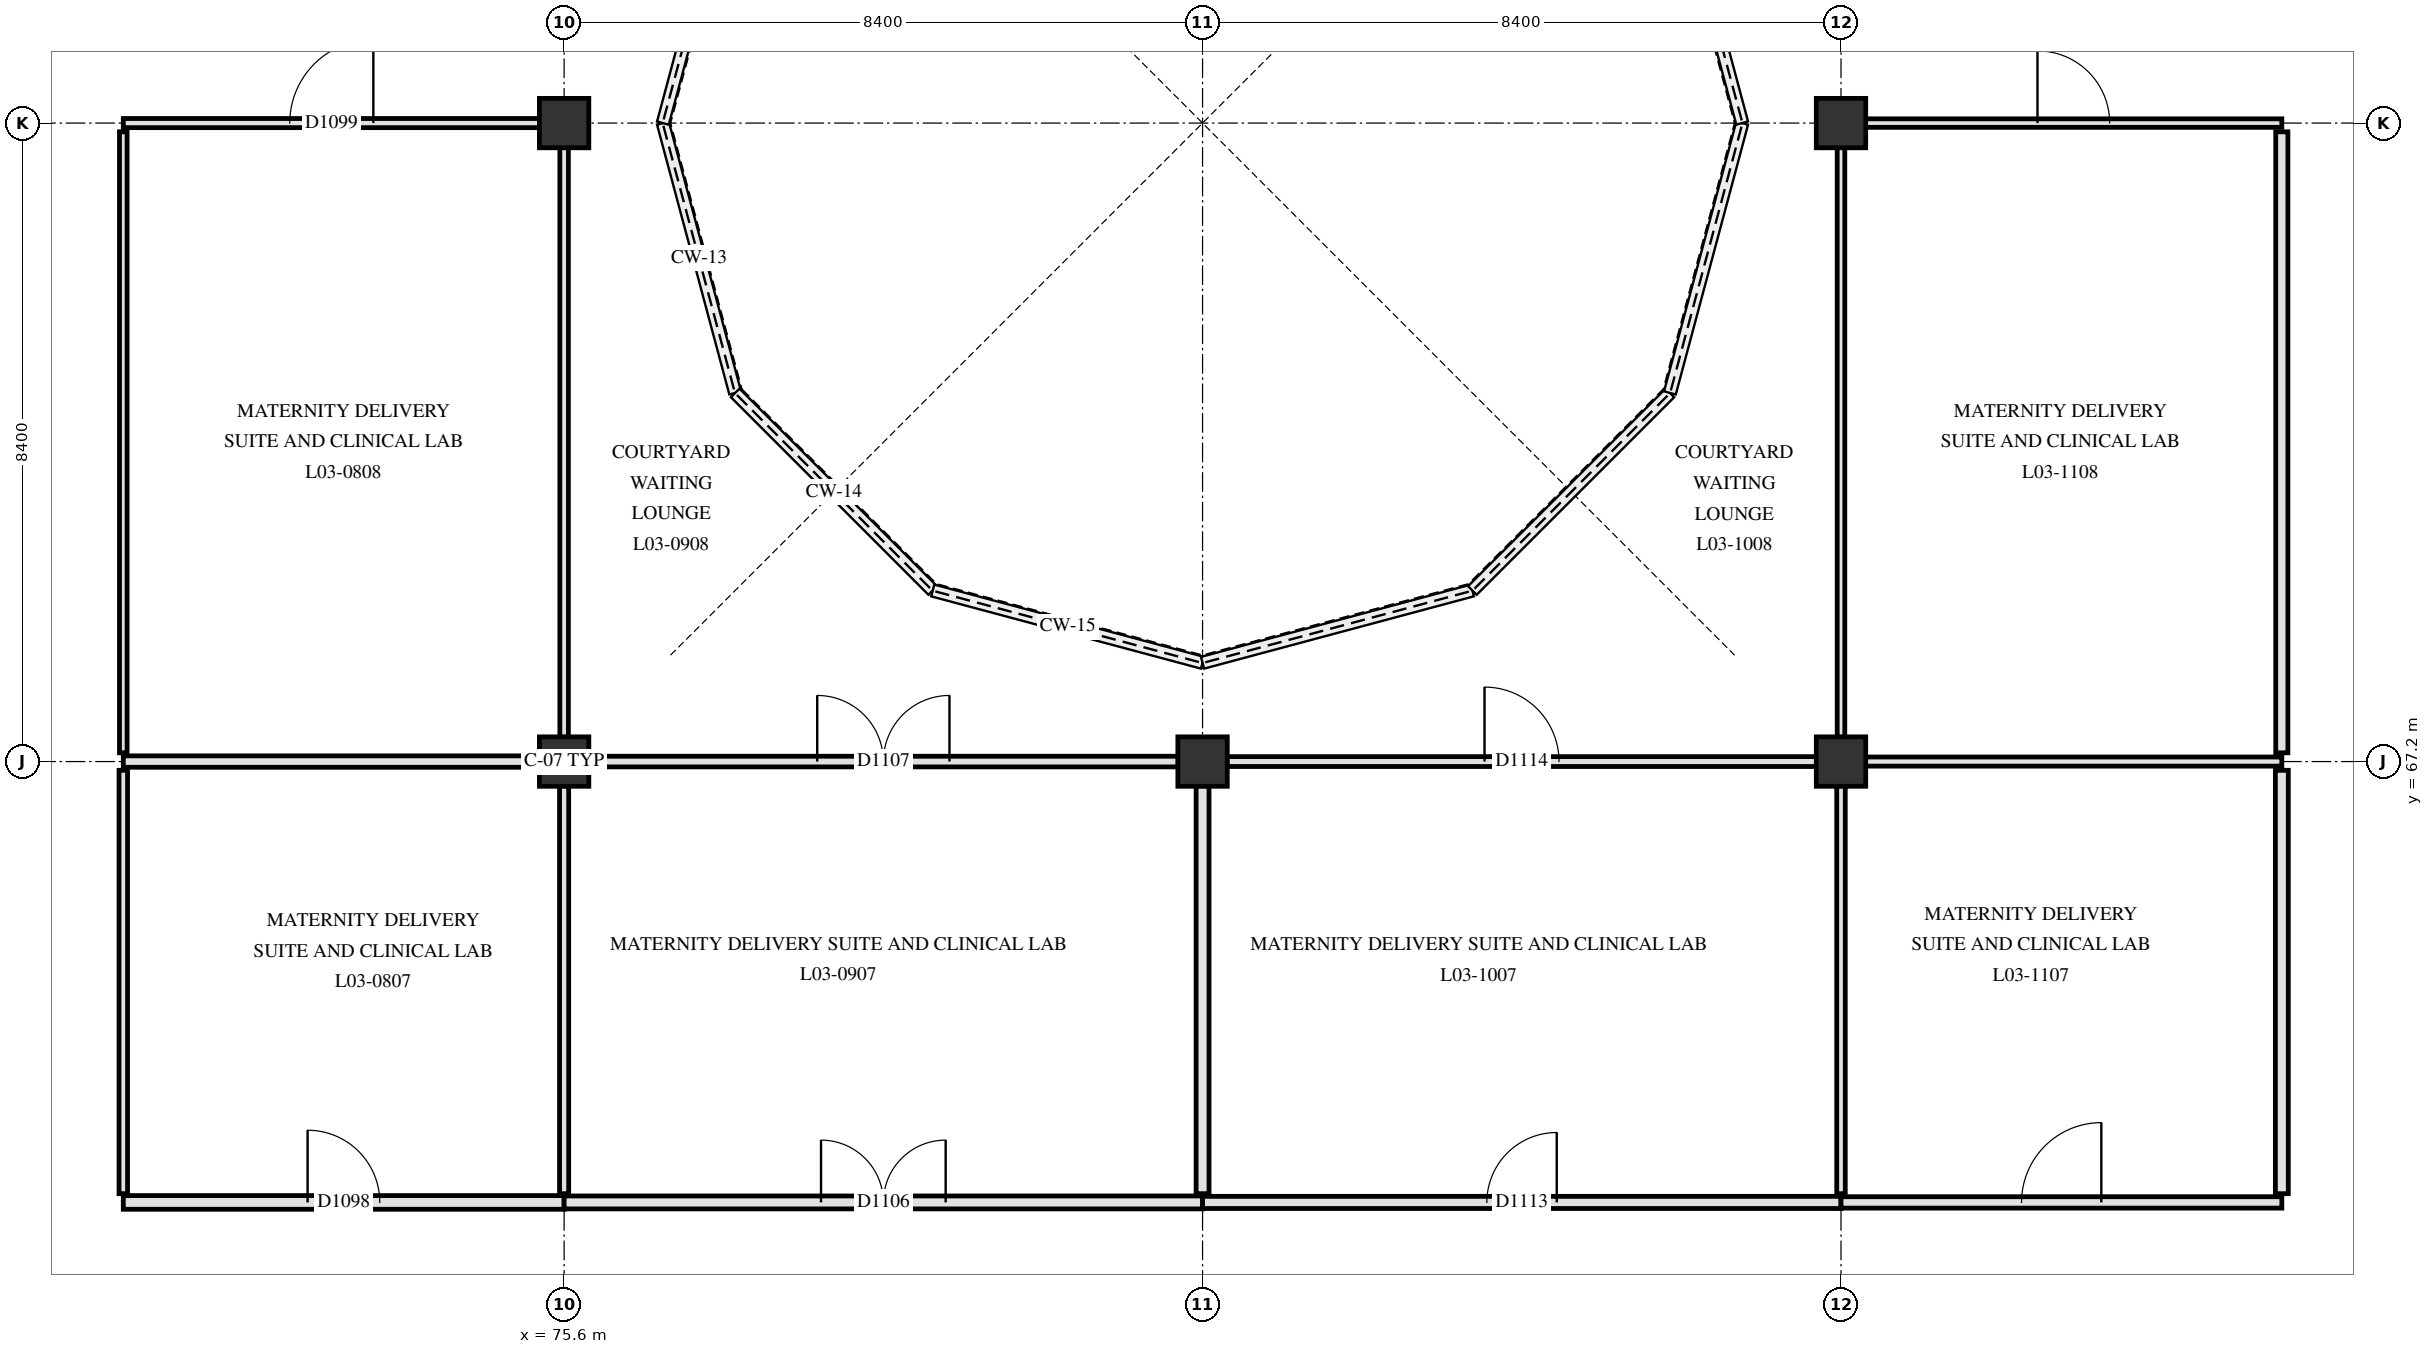
"""IFC4 building model, lengths in metres.
Left out: names, types, materials, properties, quantities, classifications, styles, units other than length and angle.
Written with IfcOpenShell. Run it as: python <this file> out.ifc"""

import sys

from ifc_helpers import new_model, si_unit, direction, frame, frame_2d, origin, origin_2d, place, context, subcontext, project, spatial, rectangle, circle, extrude, element, fill, save


model = new_model("IFC4")
c1 = context("Model", 3, precision=1e-05, world=origin(), true_north=direction((0.0, 1.0)))
c2 = subcontext(c1, "Body", "Model", "MODEL_VIEW")
j1 = project(units=[si_unit("LENGTHUNIT", "METRE"), si_unit("PLANEANGLEUNIT", "RADIAN")], contexts=[c1])
p1 = place(None, origin())
s1 = spatial("IfcSite", under=j1, at=p1, CompositionType="ELEMENT")
p2 = place(p1, origin())
s2 = spatial("IfcBuilding", under=s1, at=p2, CompositionType="ELEMENT")
p3 = place(p2, frame((0.0, 0.0, 14.4)))
s3 = spatial("IfcBuildingStorey", under=s2, at=p3, CompositionType="ELEMENT", Elevation=14.4)
for number, where, z_axis, x_axis in (
    (1, (75.6, 67.2, 0.0), (0.0, 0.0, 1.0), (1.0, 0.0, 0.0)),
    (2, (75.6, 75.6, 0.0), (0.0, 0.0, 1.0), (1.0, 0.0, 0.0)),
    (3, (84.0, 67.2, 0.0), (0.0, 0.0, 1.0), (1.0, 0.0, 0.0)),
    (4, (92.4, 67.2, 0.0), (0.0, 0.0, 1.0), (1.0, 0.0, 0.0)),
    (5, (92.4, 75.6, 0.0), (0.0, 0.0, 1.0), (1.0, 0.0, 0.0)),
):
    element("IfcColumn", number, at=place(p3, frame(where, z_axis=z_axis, x_axis=x_axis)), inside=s3, PredefinedType="COLUMN", context=c2, shape_type="SweptSolid", body=[
        extrude(circle(Radius=0.325, at=origin_2d()), origin(), (0.0, 0.0, 1.0), 4.2),
    ])
p4 = place(p3, frame((69.8, 61.4, 0.0), z_axis=(0.0, 0.0, 1.0), x_axis=(1.0, 0.0, 0.0)))
e6 = element("IfcWall", 6, at=p4, inside=s3, PredefinedType="PARTITIONING", context=c2, shape_type="SweptSolid", body=[
    extrude(rectangle(XDim=5.8, YDim=0.18, at=frame_2d((2.9, 0.0))), origin(), (0.0, 0.0, 1.0), 3.33),
])
p5 = place(p4, frame((2.425, 0.0, 0.0)))
e7 = element("IfcOpeningElement", 7, at=p5, cuts=e6, PredefinedType="OPENING", context=c2, shape_type="SweptSolid", body=[
    extrude(rectangle(XDim=0.95, YDim=2.1, at=frame_2d((0.475, 1.05))), frame((0.0, 0.1, 0.0), z_axis=(0.0, -1.0, 0.0), x_axis=(1.0, 0.0, 0.0)), (0.0, 0.0, 1.0), 0.2),
])
p6 = place(p3, frame((75.6, 61.4, 0.0), z_axis=(0.0, 0.0, 1.0), x_axis=(1.0, 0.0, 0.0)))
e8 = element("IfcWall", 8, at=p6, inside=s3, PredefinedType="PARTITIONING", context=c2, shape_type="SweptSolid", body=[
    extrude(rectangle(XDim=8.4, YDim=0.17, at=frame_2d((4.2, 0.0))), origin(), (0.0, 0.0, 1.0), 3.33),
])
p7 = place(p6, frame((3.38, 0.0, 0.0)))
e9 = element("IfcOpeningElement", 9, at=p7, cuts=e8, PredefinedType="OPENING", context=c2, shape_type="SweptSolid", body=[
    extrude(rectangle(XDim=1.64, YDim=2.28, at=frame_2d((0.82, 1.14))), frame((0.0, 0.095, 0.0), z_axis=(0.0, -1.0, 0.0), x_axis=(1.0, 0.0, 0.0)), (0.0, 0.0, 1.0), 0.19),
])
p8 = place(p3, frame((84.0, 61.4, 0.0), z_axis=(0.0, 0.0, 1.0), x_axis=(1.0, 0.0, 0.0)))
e10 = element("IfcWall", 10, at=p8, inside=s3, PredefinedType="PARTITIONING", context=c2, shape_type="SweptSolid", body=[
    extrude(rectangle(XDim=8.4, YDim=0.16, at=frame_2d((4.2, 0.0))), origin(), (0.0, 0.0, 1.0), 3.33),
])
p9 = place(p8, frame((3.74, 0.0, 0.0)))
e11 = element("IfcOpeningElement", 11, at=p9, cuts=e10, PredefinedType="OPENING", context=c2, shape_type="SweptSolid", body=[
    extrude(rectangle(XDim=0.92, YDim=2.08, at=frame_2d((0.46, 1.04))), frame((0.0, 0.09, 0.0), z_axis=(0.0, -1.0, 0.0), x_axis=(1.0, 0.0, 0.0)), (0.0, 0.0, 1.0), 0.18),
])
p10 = place(p3, frame((92.4, 61.4, 0.0), z_axis=(0.0, 0.0, 1.0), x_axis=(1.0, 0.0, 0.0)))
e12 = element("IfcWall", 12, at=p10, inside=s3, PredefinedType="PARTITIONING", context=c2, shape_type="SweptSolid", body=[
    extrude(rectangle(XDim=5.8, YDim=0.15, at=frame_2d((2.9, 0.0))), origin(), (0.0, 0.0, 1.0), 3.33),
])
p11 = place(p10, frame((2.375, 0.0, 0.0)))
e13 = element("IfcOpeningElement", 13, at=p11, cuts=e12, PredefinedType="OPENING", context=c2, shape_type="SweptSolid", body=[
    extrude(rectangle(XDim=1.05, YDim=2.15, at=frame_2d((0.525, 1.075))), frame((0.0, 0.085, 0.0), z_axis=(0.0, -1.0, 0.0), x_axis=(1.0, 0.0, 0.0)), (0.0, 0.0, 1.0), 0.17),
])
p12 = place(p3, frame((69.8, 67.2, 0.0), z_axis=(0.0, 0.0, 1.0), x_axis=(1.0, 0.0, 0.0)))
e14 = element("IfcWall", 14, at=p12, inside=s3, PredefinedType="PARTITIONING", context=c2, shape_type="SweptSolid", body=[
    extrude(rectangle(XDim=5.48, YDim=0.15, at=frame_2d((2.74, 0.0))), origin(), (0.0, 0.0, 1.0), 3.28),
])
p13 = place(p3, frame((75.92, 67.2, 0.0), z_axis=(0.0, 0.0, 1.0), x_axis=(1.0, 0.0, 0.0)))
e15 = element("IfcWall", 15, at=p13, inside=s3, PredefinedType="PARTITIONING", context=c2, shape_type="SweptSolid", body=[
    extrude(rectangle(XDim=7.76, YDim=0.14, at=frame_2d((3.88, 0.0))), origin(), (0.0, 0.0, 1.0), 3.28),
])
p14 = place(p13, frame((3.01, 0.0, 0.0)))
e16 = element("IfcOpeningElement", 16, at=p14, cuts=e15, PredefinedType="OPENING", context=c2, shape_type="SweptSolid", body=[
    extrude(rectangle(XDim=1.74, YDim=2.24, at=frame_2d((0.87, 1.12))), frame((0.0, 0.08, 0.0), z_axis=(0.0, -1.0, 0.0), x_axis=(1.0, 0.0, 0.0)), (0.0, 0.0, 1.0), 0.16),
])
p15 = place(p3, frame((84.32, 67.2, 0.0), z_axis=(0.0, 0.0, 1.0), x_axis=(1.0, 0.0, 0.0)))
e17 = element("IfcWall", 17, at=p15, inside=s3, PredefinedType="PARTITIONING", context=c2, shape_type="SweptSolid", body=[
    extrude(rectangle(XDim=7.76, YDim=0.13, at=frame_2d((3.88, 0.0))), origin(), (0.0, 0.0, 1.0), 3.28),
])
p16 = place(p15, frame((3.39, 0.0, 0.0)))
e18 = element("IfcOpeningElement", 18, at=p16, cuts=e17, PredefinedType="OPENING", context=c2, shape_type="SweptSolid", body=[
    extrude(rectangle(XDim=0.98, YDim=2.12, at=frame_2d((0.49, 1.06))), frame((0.0, 0.075, 0.0), z_axis=(0.0, -1.0, 0.0), x_axis=(1.0, 0.0, 0.0)), (0.0, 0.0, 1.0), 0.15),
])
p17 = place(p3, frame((92.72, 67.2, 0.0), z_axis=(0.0, 0.0, 1.0), x_axis=(1.0, 0.0, 0.0)))
e19 = element("IfcWall", 19, at=p17, inside=s3, PredefinedType="PARTITIONING", context=c2, shape_type="SweptSolid", body=[
    extrude(rectangle(XDim=5.48, YDim=0.12, at=frame_2d((2.74, 0.0))), origin(), (0.0, 0.0, 1.0), 3.29),
])
p18 = place(p3, frame((69.8, 75.6, 0.0), z_axis=(0.0, 0.0, 1.0), x_axis=(1.0, 0.0, 0.0)))
e20 = element("IfcWall", 20, at=p18, inside=s3, PredefinedType="PARTITIONING", context=c2, shape_type="SweptSolid", body=[
    extrude(rectangle(XDim=5.48, YDim=0.12, at=frame_2d((2.74, 0.0))), origin(), (0.0, 0.0, 1.0), 3.28),
])
p19 = place(p18, frame((2.19, 0.0, 0.0)))
e21 = element("IfcOpeningElement", 21, at=p19, cuts=e20, PredefinedType="OPENING", context=c2, shape_type="SweptSolid", body=[
    extrude(rectangle(XDim=1.1, YDim=2.15, at=frame_2d((0.55, 1.075))), frame((0.0, 0.07, 0.0), z_axis=(0.0, -1.0, 0.0), x_axis=(1.0, 0.0, 0.0)), (0.0, 0.0, 1.0), 0.14),
])
p20 = place(p3, frame((92.72, 75.6, 0.0), z_axis=(0.0, 0.0, 1.0), x_axis=(1.0, 0.0, 0.0)))
e22 = element("IfcWall", 22, at=p20, inside=s3, PredefinedType="PARTITIONING", context=c2, shape_type="SweptSolid", body=[
    extrude(rectangle(XDim=5.48, YDim=0.112, at=frame_2d((2.74, 0.0))), origin(), (0.0, 0.0, 1.0), 3.29),
])
p21 = place(p20, frame((2.265, 0.0, 0.0)))
e23 = element("IfcOpeningElement", 23, at=p21, cuts=e22, PredefinedType="OPENING", context=c2, shape_type="SweptSolid", body=[
    extrude(rectangle(XDim=0.95, YDim=2.1, at=frame_2d((0.475, 1.05))), frame((0.0, 0.066, 0.0), z_axis=(0.0, -1.0, 0.0), x_axis=(1.0, 0.0, 0.0)), (0.0, 0.0, 1.0), 0.132),
])
p22 = place(p3, frame((69.8, 61.515, 0.0), z_axis=(0.0, 0.0, 1.0), x_axis=(0.0, 1.0, 0.0)))
e24 = element("IfcWall", 24, at=p22, inside=s3, PredefinedType="PARTITIONING", context=c2, shape_type="SweptSolid", body=[
    extrude(rectangle(XDim=5.57, YDim=0.112, at=frame_2d((2.785, 0.0))), origin(), (0.0, 0.0, 1.0), 3.28),
])
p23 = place(p3, frame((69.8, 67.315, 0.0), z_axis=(0.0, 0.0, 1.0), x_axis=(0.0, 1.0, 0.0)))
e25 = element("IfcWall", 25, at=p23, inside=s3, PredefinedType="PARTITIONING", context=c2, shape_type="SweptSolid", body=[
    extrude(rectangle(XDim=8.17, YDim=0.1, at=frame_2d((4.085, 0.0))), origin(), (0.0, 0.0, 1.0), 3.28),
])
p24 = place(p3, frame((75.6, 61.515, 0.0), z_axis=(0.0, 0.0, 1.0), x_axis=(0.0, 1.0, 0.0)))
e26 = element("IfcWall", 26, at=p24, inside=s3, PredefinedType="PARTITIONING", context=c2, shape_type="SweptSolid", body=[
    extrude(rectangle(XDim=5.365, YDim=0.12, at=frame_2d((2.683, 0.0))), origin(), (0.0, 0.0, 1.0), 3.33),
])
p25 = place(p3, frame((75.6, 67.52, 0.0), z_axis=(0.0, 0.0, 1.0), x_axis=(0.0, 1.0, 0.0)))
e27 = element("IfcWall", 27, at=p25, inside=s3, PredefinedType="PARTITIONING", context=c2, shape_type="SweptSolid", body=[
    extrude(rectangle(XDim=7.76, YDim=0.112, at=frame_2d((3.88, 0.0))), origin(), (0.0, 0.0, 1.0), 3.33),
])
p26 = place(p3, frame((84.0, 61.515, 0.0), z_axis=(0.0, 0.0, 1.0), x_axis=(0.0, 1.0, 0.0)))
e28 = element("IfcWall", 28, at=p26, inside=s3, PredefinedType="PARTITIONING", context=c2, shape_type="SweptSolid", body=[
    extrude(rectangle(XDim=5.365, YDim=0.17, at=frame_2d((2.683, 0.0))), origin(), (0.0, 0.0, 1.0), 3.33),
])
p27 = place(p3, frame((92.4, 61.515, 0.0), z_axis=(0.0, 0.0, 1.0), x_axis=(0.0, 1.0, 0.0)))
e29 = element("IfcWall", 29, at=p27, inside=s3, PredefinedType="PARTITIONING", context=c2, shape_type="SweptSolid", body=[
    extrude(rectangle(XDim=5.365, YDim=0.112, at=frame_2d((2.683, 0.0))), origin(), (0.0, 0.0, 1.0), 3.33),
])
p28 = place(p3, frame((92.4, 67.52, 0.0), z_axis=(0.0, 0.0, 1.0), x_axis=(0.0, 1.0, 0.0)))
e30 = element("IfcWall", 30, at=p28, inside=s3, PredefinedType="PARTITIONING", context=c2, shape_type="SweptSolid", body=[
    extrude(rectangle(XDim=7.76, YDim=0.1, at=frame_2d((3.88, 0.0))), origin(), (0.0, 0.0, 1.0), 3.33),
])
p29 = place(p3, frame((98.2, 61.515, 0.0), z_axis=(0.0, 0.0, 1.0), x_axis=(0.0, 1.0, 0.0)))
e31 = element("IfcWall", 31, at=p29, inside=s3, PredefinedType="PARTITIONING", context=c2, shape_type="SweptSolid", body=[
    extrude(rectangle(XDim=5.57, YDim=0.17, at=frame_2d((2.785, 0.0))), origin(), (0.0, 0.0, 1.0), 3.29),
])
p30 = place(p3, frame((98.2, 67.315, 0.0), z_axis=(0.0, 0.0, 1.0), x_axis=(0.0, 1.0, 0.0)))
e32 = element("IfcWall", 32, at=p30, inside=s3, PredefinedType="PARTITIONING", context=c2, shape_type="SweptSolid", body=[
    extrude(rectangle(XDim=8.17, YDim=0.16, at=frame_2d((4.085, 0.0))), origin(), (0.0, 0.0, 1.0), 3.29),
])
p31 = place(p5, origin())
e33 = element("IfcDoor", 33, at=p31, inside=s3, OperationType="SINGLE_SWING_LEFT", PredefinedType="DOOR", context=c2, shape_type="SweptSolid", body=[
    extrude(rectangle(XDim=0.95, YDim=2.1, at=frame_2d((0.475, 1.05))), frame((0.0, 0.025, 0.0), z_axis=(0.0, -1.0, 0.0), x_axis=(1.0, 0.0, 0.0)), (0.0, 0.0, 1.0), 0.05),
])
fill(e7, e33)
p32 = place(p19, origin())
e34 = element("IfcDoor", 34, at=p32, inside=s3, OperationType="SINGLE_SWING_RIGHT", PredefinedType="DOOR", context=c2, shape_type="SweptSolid", body=[
    extrude(rectangle(XDim=1.1, YDim=2.15, at=frame_2d((0.55, 1.075))), frame((0.0, 0.025, 0.0), z_axis=(0.0, -1.0, 0.0), x_axis=(1.0, 0.0, 0.0)), (0.0, 0.0, 1.0), 0.05),
])
fill(e21, e34)
p33 = place(p7, origin())
e35 = element("IfcDoor", 35, at=p33, inside=s3, OperationType="DOUBLE_SWING_LEFT", PredefinedType="DOOR", context=c2, shape_type="SweptSolid", body=[
    extrude(rectangle(XDim=1.64, YDim=2.28, at=frame_2d((0.82, 1.14))), frame((0.0, 0.025, 0.0), z_axis=(0.0, -1.0, 0.0), x_axis=(1.0, 0.0, 0.0)), (0.0, 0.0, 1.0), 0.05),
])
fill(e9, e35)
p34 = place(p14, origin())
e36 = element("IfcDoor", 36, at=p34, inside=s3, OperationType="DOUBLE_SWING_RIGHT", PredefinedType="DOOR", context=c2, shape_type="SweptSolid", body=[
    extrude(rectangle(XDim=1.74, YDim=2.24, at=frame_2d((0.87, 1.12))), frame((0.0, 0.025, 0.0), z_axis=(0.0, -1.0, 0.0), x_axis=(1.0, 0.0, 0.0)), (0.0, 0.0, 1.0), 0.05),
])
fill(e16, e36)
p35 = place(p9, origin())
e37 = element("IfcDoor", 37, at=p35, inside=s3, OperationType="SINGLE_SWING_RIGHT", PredefinedType="DOOR", context=c2, shape_type="SweptSolid", body=[
    extrude(rectangle(XDim=0.92, YDim=2.08, at=frame_2d((0.46, 1.04))), frame((0.0, 0.025, 0.0), z_axis=(0.0, -1.0, 0.0), x_axis=(1.0, 0.0, 0.0)), (0.0, 0.0, 1.0), 0.05),
])
fill(e11, e37)
p36 = place(p16, origin())
e38 = element("IfcDoor", 38, at=p36, inside=s3, OperationType="SINGLE_SWING_LEFT", PredefinedType="DOOR", context=c2, shape_type="SweptSolid", body=[
    extrude(rectangle(XDim=0.98, YDim=2.12, at=frame_2d((0.49, 1.06))), frame((0.0, 0.025, 0.0), z_axis=(0.0, -1.0, 0.0), x_axis=(1.0, 0.0, 0.0)), (0.0, 0.0, 1.0), 0.05),
])
fill(e18, e38)
p37 = place(p11, origin())
e39 = element("IfcDoor", 39, at=p37, inside=s3, OperationType="SINGLE_SWING_RIGHT", PredefinedType="DOOR", context=c2, shape_type="SweptSolid", body=[
    extrude(rectangle(XDim=1.05, YDim=2.15, at=frame_2d((0.525, 1.075))), frame((0.0, 0.025, 0.0), z_axis=(0.0, -1.0, 0.0), x_axis=(1.0, 0.0, 0.0)), (0.0, 0.0, 1.0), 0.05),
])
fill(e13, e39)
p38 = place(p21, origin())
e40 = element("IfcDoor", 40, at=p38, inside=s3, OperationType="SINGLE_SWING_LEFT", PredefinedType="DOOR", context=c2, shape_type="SweptSolid", body=[
    extrude(rectangle(XDim=0.95, YDim=2.1, at=frame_2d((0.475, 1.05))), frame((0.0, 0.025, 0.0), z_axis=(0.0, -1.0, 0.0), x_axis=(1.0, 0.0, 0.0)), (0.0, 0.0, 1.0), 0.05),
])
fill(e23, e40)
save(model, sys.argv[1])
